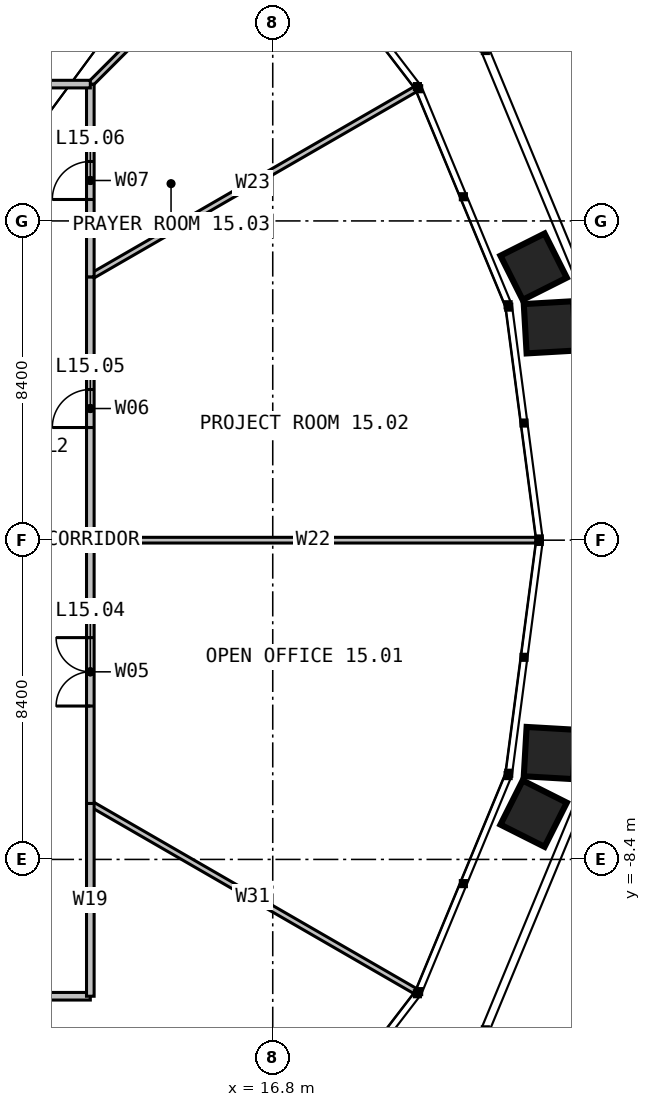
"""IFC4 building model, lengths in metres.
Left out: names, types, materials, properties, quantities, classifications, styles, units other than length and angle.
Written with IfcOpenShell. Run it as: python <this file> out.ifc"""

import sys

from ifc_helpers import new_model, si_unit, direction, frame, frame_2d, origin, place, context, subcontext, project, spatial, rectangle, extrude, element, fill, save


model = new_model("IFC4")
c1 = context("Model", 3, precision=1e-05, world=origin(), true_north=direction((0.0, 1.0)))
c2 = subcontext(c1, "Body", "Model", "MODEL_VIEW")
j1 = project(units=[si_unit("LENGTHUNIT", "METRE"), si_unit("PLANEANGLEUNIT", "RADIAN")], contexts=[c1])
p1 = place(None, origin())
s1 = spatial("IfcSite", under=j1, at=p1, CompositionType="ELEMENT")
p2 = place(p1, origin())
s2 = spatial("IfcBuilding", under=s1, at=p2, CompositionType="ELEMENT")
p3 = place(p2, frame((0.0, 0.0, 65.0)))
s3 = spatial("IfcBuildingStorey", under=s2, at=p3, CompositionType="ELEMENT", Elevation=65.0)
p4 = place(p3, frame((12.0, -6.928, 0.0), z_axis=(0.0, 0.0, 1.0), x_axis=(0.866031940362, -0.499988678145, 0.0)))
e1 = element("IfcWall", 1, at=p4, inside=s3, PredefinedType="PARTITIONING", context=c2, shape_type="SweptSolid", body=[
    extrude(rectangle(XDim=9.87, YDim=0.15, at=frame_2d((4.935, 0.0))), origin(), (0.0, 0.0, 1.0), 2.79),
])
p5 = place(p3, frame((12.0, 0.0, 0.0), z_axis=(0.0, 0.0, 1.0), x_axis=(1.0, 0.0, 0.0)))
e2 = element("IfcWall", 2, at=p5, inside=s3, PredefinedType="PARTITIONING", context=c2, shape_type="SweptSolid", body=[
    extrude(rectangle(XDim=11.726, YDim=0.15, at=frame_2d((5.863, 0.0))), origin(), (0.0, 0.0, 1.0), 2.79),
])
p6 = place(p3, frame((12.0, 6.928, 0.0), z_axis=(0.0, 0.0, 1.0), x_axis=(0.866031940362, 0.499988678145, 0.0)))
e3 = element("IfcWall", 3, at=p6, inside=s3, PredefinedType="PARTITIONING", context=c2, shape_type="SweptSolid", body=[
    extrude(rectangle(XDim=9.87, YDim=0.15, at=frame_2d((4.935, 0.0))), origin(), (0.0, 0.0, 1.0), 2.79),
])
p7 = place(p3, frame((12.0, 12.0, 0.0), z_axis=(0.0, 0.0, 1.0), x_axis=(0.707106781187, 0.707106781187, 0.0)))
e4 = element("IfcWall", 4, at=p7, inside=s3, PredefinedType="PARTITIONING", context=c2, shape_type="SweptSolid", body=[
    extrude(rectangle(XDim=6.756, YDim=0.15, at=frame_2d((3.378, 0.0))), origin(), (0.0, 0.0, 1.0), 2.79),
])
p8 = place(p3, frame((6.928, -12.0, 0.0), z_axis=(0.0, 0.0, 1.0), x_axis=(0.499988678145, -0.866031940362, 0.0)))
e5 = element("IfcWall", 5, at=p8, inside=s3, PredefinedType="PARTITIONING", context=c2, shape_type="SweptSolid", body=[
    extrude(rectangle(XDim=9.87, YDim=0.15, at=frame_2d((4.935, 0.0))), origin(), (0.0, 0.0, 1.0), 2.79),
])
p9 = place(p3, frame((12.0, -6.928, 0.0), z_axis=(0.0, 0.0, 1.0), x_axis=(0.0, 1.0, 0.0)))
e6 = element("IfcWall", 6, at=p9, inside=s3, PredefinedType="PARTITIONING", context=c2, shape_type="SweptSolid", body=[
    extrude(rectangle(XDim=6.928, YDim=0.2, at=frame_2d((3.464, 0.0))), origin(), (0.0, 0.0, 1.0), 3.8),
])
p10 = place(p9, frame((2.564, 0.0, 0.0)))
e7 = element("IfcOpeningElement", 7, at=p10, cuts=e6, PredefinedType="OPENING", context=c2, shape_type="SweptSolid", body=[
    extrude(rectangle(XDim=1.8, YDim=2.2, at=frame_2d((0.9, 1.1))), frame((0.0, 0.11, 0.0), z_axis=(0.0, -1.0, 0.0), x_axis=(1.0, 0.0, 0.0)), (0.0, 0.0, 1.0), 0.22),
])
p11 = place(p3, frame((12.0, 0.0, 0.0), z_axis=(0.0, 0.0, 1.0), x_axis=(0.0, 1.0, 0.0)))
e8 = element("IfcWall", 8, at=p11, inside=s3, PredefinedType="PARTITIONING", context=c2, shape_type="SweptSolid", body=[
    extrude(rectangle(XDim=6.928, YDim=0.2, at=frame_2d((3.464, 0.0))), origin(), (0.0, 0.0, 1.0), 3.8),
])
p12 = place(p11, frame((2.964, 0.0, 0.0)))
e9 = element("IfcOpeningElement", 9, at=p12, cuts=e8, PredefinedType="OPENING", context=c2, shape_type="SweptSolid", body=[
    extrude(rectangle(XDim=1.0, YDim=2.2, at=frame_2d((0.5, 1.1))), frame((0.0, 0.11, 0.0), z_axis=(0.0, -1.0, 0.0), x_axis=(1.0, 0.0, 0.0)), (0.0, 0.0, 1.0), 0.22),
])
p13 = place(p3, frame((12.0, 6.928, 0.0), z_axis=(0.0, 0.0, 1.0), x_axis=(0.0, 1.0, 0.0)))
e10 = element("IfcWall", 10, at=p13, inside=s3, PredefinedType="PARTITIONING", context=c2, shape_type="SweptSolid", body=[
    extrude(rectangle(XDim=5.072, YDim=0.2, at=frame_2d((2.536, 0.0))), origin(), (0.0, 0.0, 1.0), 3.8),
])
p14 = place(p13, frame((2.036, 0.0, 0.0)))
e11 = element("IfcOpeningElement", 11, at=p14, cuts=e10, PredefinedType="OPENING", context=c2, shape_type="SweptSolid", body=[
    extrude(rectangle(XDim=1.0, YDim=2.2, at=frame_2d((0.5, 1.1))), frame((0.0, 0.11, 0.0), z_axis=(0.0, -1.0, 0.0), x_axis=(1.0, 0.0, 0.0)), (0.0, 0.0, 1.0), 0.22),
])
p15 = place(p3, frame((12.0, 12.0, 0.0), z_axis=(0.0, 0.0, 1.0), x_axis=(-1.0, 0.0, 0.0)))
e12 = element("IfcWall", 12, at=p15, inside=s3, PredefinedType="PARTITIONING", context=c2, shape_type="SweptSolid", body=[
    extrude(rectangle(XDim=8.785, YDim=0.2, at=frame_2d((4.392, 0.0))), origin(), (0.0, 0.0, 1.0), 3.2),
])
p16 = place(p15, frame((3.492, 0.0, 0.0)))
e13 = element("IfcOpeningElement", 13, at=p16, cuts=e12, PredefinedType="OPENING", context=c2, shape_type="SweptSolid", body=[
    extrude(rectangle(XDim=1.8, YDim=2.2, at=frame_2d((0.9, 1.1))), frame((0.0, 0.11, 0.0), z_axis=(0.0, -1.0, 0.0), x_axis=(1.0, 0.0, 0.0)), (0.0, 0.0, 1.0), 0.22),
])
p17 = place(p3, frame((6.928, -12.0, 0.0), z_axis=(0.0, 0.0, 1.0), x_axis=(1.0, 0.0, 0.0)))
e14 = element("IfcWall", 14, at=p17, inside=s3, PredefinedType="PARTITIONING", context=c2, shape_type="SweptSolid", body=[
    extrude(rectangle(XDim=5.072, YDim=0.2, at=frame_2d((2.536, 0.0))), origin(), (0.0, 0.0, 1.0), 3.8),
])
p18 = place(p17, frame((2.036, 0.0, 0.0)))
e15 = element("IfcOpeningElement", 15, at=p18, cuts=e14, PredefinedType="OPENING", context=c2, shape_type="SweptSolid", body=[
    extrude(rectangle(XDim=1.0, YDim=2.2, at=frame_2d((0.5, 1.1))), frame((0.0, 0.11, 0.0), z_axis=(0.0, -1.0, 0.0), x_axis=(1.0, 0.0, 0.0)), (0.0, 0.0, 1.0), 0.22),
])
p19 = place(p3, frame((12.0, -12.0, 0.0), z_axis=(0.0, 0.0, 1.0), x_axis=(0.0, 1.0, 0.0)))
e16 = element("IfcWall", 16, at=p19, inside=s3, PredefinedType="PARTITIONING", context=c2, shape_type="SweptSolid", body=[
    extrude(rectangle(XDim=5.072, YDim=0.2, at=frame_2d((2.536, 0.0))), origin(), (0.0, 0.0, 1.0), 3.8),
])
p20 = place(p10, origin())
e17 = element("IfcDoor", 17, at=p20, inside=s3, OperationType="DOUBLE_DOOR_SINGLE_SWING", PredefinedType="DOOR", context=c2, shape_type="SweptSolid", body=[
    extrude(rectangle(XDim=1.8, YDim=2.2, at=frame_2d((0.9, 1.1))), frame((0.0, 0.025, 0.0), z_axis=(0.0, -1.0, 0.0), x_axis=(1.0, 0.0, 0.0)), (0.0, 0.0, 1.0), 0.05),
])
fill(e7, e17)
p21 = place(p12, origin())
e18 = element("IfcDoor", 18, at=p21, inside=s3, OperationType="SINGLE_SWING_LEFT", PredefinedType="DOOR", context=c2, shape_type="SweptSolid", body=[
    extrude(rectangle(XDim=1.0, YDim=2.2, at=frame_2d((0.5, 1.1))), frame((0.0, 0.025, 0.0), z_axis=(0.0, -1.0, 0.0), x_axis=(1.0, 0.0, 0.0)), (0.0, 0.0, 1.0), 0.05),
])
fill(e9, e18)
p22 = place(p14, origin())
e19 = element("IfcDoor", 19, at=p22, inside=s3, OperationType="SINGLE_SWING_LEFT", PredefinedType="DOOR", context=c2, shape_type="SweptSolid", body=[
    extrude(rectangle(XDim=1.0, YDim=2.2, at=frame_2d((0.5, 1.1))), frame((0.0, 0.025, 0.0), z_axis=(0.0, -1.0, 0.0), x_axis=(1.0, 0.0, 0.0)), (0.0, 0.0, 1.0), 0.05),
])
fill(e11, e19)
save(model, sys.argv[1])
